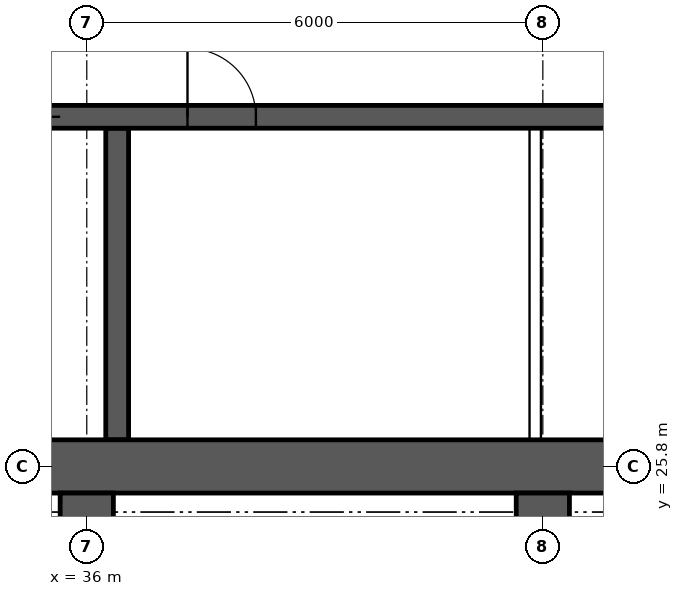
"""IFC4 building model, lengths in metres.
Left out: names, types, materials, properties, quantities, classifications, styles, units other than length and angle.
Written with IfcOpenShell. Run it as: python <this file> out.ifc"""

import sys

from ifc_helpers import new_model, si_unit, direction, frame, frame_2d, origin, place, context, subcontext, project, spatial, rectangle, extrude, element, fill, save


model = new_model("IFC4")
c1 = context("Model", 3, precision=1e-05, world=origin(), true_north=direction((0.0, 1.0)))
c2 = subcontext(c1, "Body", "Model", "MODEL_VIEW")
j1 = project(units=[si_unit("LENGTHUNIT", "METRE"), si_unit("PLANEANGLEUNIT", "RADIAN")], contexts=[c1])
p1 = place(None, origin())
s1 = spatial("IfcSite", under=j1, at=p1, CompositionType="ELEMENT")
p2 = place(p1, origin())
s2 = spatial("IfcBuilding", under=s1, at=p2, CompositionType="ELEMENT")
p3 = place(p2, frame((0.0, 0.0, 224.05)))
s3 = spatial("IfcBuildingStorey", under=s2, at=p3, CompositionType="ELEMENT", Elevation=224.05)
p4 = place(p3, frame((18.0, 25.8, 0.0), z_axis=(0.0, 0.0, 1.0), x_axis=(1.0, 0.0, 0.0)))
e1 = element("IfcWall", 1, at=p4, inside=s3, PredefinedType="SHEAR", context=c2, shape_type="SweptSolid", body=[
    extrude(rectangle(XDim=48.0, YDim=0.7, at=frame_2d((24.0, 0.0))), origin(), (0.0, 0.0, 1.0), 3.75),
])
p5 = place(p3, frame((18.35, 30.4, 0.0), z_axis=(0.0, 0.0, 1.0), x_axis=(1.0, 0.0, 0.0)))
e2 = element("IfcWall", 2, at=p5, inside=s3, PredefinedType="SHEAR", context=c2, shape_type="SweptSolid", body=[
    extrude(rectangle(XDim=47.3, YDim=0.3, at=frame_2d((23.65, 0.0))), origin(), (0.0, 0.0, 1.0), 3.75),
])
p6 = place(p5, frame((0.4, 0.0, 0.0)))
e3 = element("IfcOpeningElement", 3, at=p6, cuts=e2, PredefinedType="OPENING", context=c2, shape_type="SweptSolid", body=[
    extrude(rectangle(XDim=1.0, YDim=2.1, at=frame_2d((0.5, 1.05))), frame((0.0, 0.16, 0.0), z_axis=(0.0, -1.0, 0.0), x_axis=(1.0, 0.0, 0.0)), (0.0, 0.0, 1.0), 0.32),
])
p7 = place(p5, frame((45.9, 0.0, 0.0)))
e4 = element("IfcOpeningElement", 4, at=p7, cuts=e2, PredefinedType="OPENING", context=c2, shape_type="SweptSolid", body=[
    extrude(rectangle(XDim=1.0, YDim=2.1, at=frame_2d((0.5, 1.05))), frame((0.0, 0.16, 0.0), z_axis=(0.0, -1.0, 0.0), x_axis=(1.0, 0.0, 0.0)), (0.0, 0.0, 1.0), 0.32),
])
p8 = place(p5, frame((8.4, 0.0, 0.0)))
e5 = element("IfcOpeningElement", 5, at=p8, cuts=e2, PredefinedType="OPENING", context=c2, shape_type="SweptSolid", body=[
    extrude(rectangle(XDim=1.1, YDim=2.1, at=frame_2d((0.55, 1.05))), frame((0.0, 0.16, 0.0), z_axis=(0.0, -1.0, 0.0), x_axis=(1.0, 0.0, 0.0)), (0.0, 0.0, 1.0), 0.32),
])
p9 = place(p5, frame((11.0, 0.0, 0.0)))
e6 = element("IfcOpeningElement", 6, at=p9, cuts=e2, PredefinedType="OPENING", context=c2, shape_type="SweptSolid", body=[
    extrude(rectangle(XDim=1.1, YDim=2.1, at=frame_2d((0.55, 1.05))), frame((0.0, 0.16, 0.0), z_axis=(0.0, -1.0, 0.0), x_axis=(1.0, 0.0, 0.0)), (0.0, 0.0, 1.0), 0.32),
])
p10 = place(p5, frame((13.6, 0.0, 0.0)))
e7 = element("IfcOpeningElement", 7, at=p10, cuts=e2, PredefinedType="OPENING", context=c2, shape_type="SweptSolid", body=[
    extrude(rectangle(XDim=1.1, YDim=2.1, at=frame_2d((0.55, 1.05))), frame((0.0, 0.16, 0.0), z_axis=(0.0, -1.0, 0.0), x_axis=(1.0, 0.0, 0.0)), (0.0, 0.0, 1.0), 0.32),
])
p11 = place(p5, frame((16.2, 0.0, 0.0)))
e8 = element("IfcOpeningElement", 8, at=p11, cuts=e2, PredefinedType="OPENING", context=c2, shape_type="SweptSolid", body=[
    extrude(rectangle(XDim=1.1, YDim=2.1, at=frame_2d((0.55, 1.05))), frame((0.0, 0.16, 0.0), z_axis=(0.0, -1.0, 0.0), x_axis=(1.0, 0.0, 0.0)), (0.0, 0.0, 1.0), 0.32),
])
p12 = place(p5, frame((18.975, 0.0, 0.0)))
e9 = element("IfcOpeningElement", 9, at=p12, cuts=e2, PredefinedType="OPENING", context=c2, shape_type="SweptSolid", body=[
    extrude(rectangle(XDim=0.9, YDim=2.1, at=frame_2d((0.45, 1.05))), frame((0.0, 0.16, 0.0), z_axis=(0.0, -1.0, 0.0), x_axis=(1.0, 0.0, 0.0)), (0.0, 0.0, 1.0), 0.32),
])
p13 = place(p5, frame((24.475, 0.0, 0.0)))
e10 = element("IfcOpeningElement", 10, at=p13, cuts=e2, PredefinedType="OPENING", context=c2, shape_type="SweptSolid", body=[
    extrude(rectangle(XDim=0.9, YDim=2.1, at=frame_2d((0.45, 1.05))), frame((0.0, 0.16, 0.0), z_axis=(0.0, -1.0, 0.0), x_axis=(1.0, 0.0, 0.0)), (0.0, 0.0, 1.0), 0.32),
])
p14 = place(p5, frame((30.267, 0.0, 0.0)))
e11 = element("IfcOpeningElement", 11, at=p14, cuts=e2, PredefinedType="OPENING", context=c2, shape_type="SweptSolid", body=[
    extrude(rectangle(XDim=1.1, YDim=2.1, at=frame_2d((0.55, 1.05))), frame((0.0, 0.16, 0.0), z_axis=(0.0, -1.0, 0.0), x_axis=(1.0, 0.0, 0.0)), (0.0, 0.0, 1.0), 0.32),
])
p15 = place(p5, frame((33.8, 0.0, 0.0)))
e12 = element("IfcOpeningElement", 12, at=p15, cuts=e2, PredefinedType="OPENING", context=c2, shape_type="SweptSolid", body=[
    extrude(rectangle(XDim=1.1, YDim=2.1, at=frame_2d((0.55, 1.05))), frame((0.0, 0.16, 0.0), z_axis=(0.0, -1.0, 0.0), x_axis=(1.0, 0.0, 0.0)), (0.0, 0.0, 1.0), 0.32),
])
p16 = place(p5, frame((37.333, 0.0, 0.0)))
e13 = element("IfcOpeningElement", 13, at=p16, cuts=e2, PredefinedType="OPENING", context=c2, shape_type="SweptSolid", body=[
    extrude(rectangle(XDim=1.1, YDim=2.1, at=frame_2d((0.55, 1.05))), frame((0.0, 0.16, 0.0), z_axis=(0.0, -1.0, 0.0), x_axis=(1.0, 0.0, 0.0)), (0.0, 0.0, 1.0), 0.32),
])
p17 = place(p3, frame((36.4, 26.15, 0.0), z_axis=(0.0, 0.0, 1.0), x_axis=(0.0, 1.0, 0.0)))
e14 = element("IfcWall", 14, at=p17, inside=s3, PredefinedType="SHEAR", context=c2, shape_type="SweptSolid", body=[
    extrude(rectangle(XDim=4.1, YDim=0.3, at=frame_2d((2.05, 0.0))), origin(), (0.0, 0.0, 1.0), 3.75),
])
for number, where, z_axis, x_axis in (
    (15, (36.0, 18.4, 0.0), (0.0, 0.0, 1.0), (0.0, 1.0, 0.0)),
    (16, (42.0, 18.4, 0.0), (0.0, 0.0, 1.0), (0.0, 1.0, 0.0)),
):
    element("IfcWall", number, at=place(p3, frame(where, z_axis=z_axis, x_axis=x_axis)), inside=s3, PredefinedType="SHEAR", context=c2, shape_type="SweptSolid", body=[
        extrude(rectangle(XDim=7.05, YDim=0.7, at=frame_2d((3.525, 0.0))), origin(), (0.0, 0.0, 1.0), 3.75),
    ])
p18 = place(p3, frame((41.9, 26.15, 0.0), z_axis=(0.0, 0.0, 1.0), x_axis=(0.0, 1.0, 0.0)))
e17 = element("IfcWall", 17, at=p18, inside=s3, PredefinedType="SOLIDWALL", context=c2, shape_type="SweptSolid", body=[
    extrude(rectangle(XDim=4.1, YDim=0.15, at=frame_2d((2.05, 0.0))), origin(), (0.0, 0.0, 1.0), 3.5),
])
p19 = place(p11, origin())
e18 = element("IfcDoor", 18, at=p19, inside=s3, OperationType="DOUBLE_DOOR_SLIDING", PredefinedType="DOOR", context=c2, shape_type="SweptSolid", body=[
    extrude(rectangle(XDim=1.1, YDim=2.1, at=frame_2d((0.55, 1.05))), frame((0.0, 0.025, 0.0), z_axis=(0.0, -1.0, 0.0), x_axis=(1.0, 0.0, 0.0)), (0.0, 0.0, 1.0), 0.05),
])
fill(e8, e18)
p20 = place(p12, origin())
e19 = element("IfcDoor", 19, at=p20, inside=s3, OperationType="SINGLE_SWING_LEFT", PredefinedType="DOOR", context=c2, shape_type="SweptSolid", body=[
    extrude(rectangle(XDim=0.9, YDim=2.1, at=frame_2d((0.45, 1.05))), frame((0.0, 0.025, 0.0), z_axis=(0.0, -1.0, 0.0), x_axis=(1.0, 0.0, 0.0)), (0.0, 0.0, 1.0), 0.05),
])
fill(e9, e19)
save(model, sys.argv[1])
